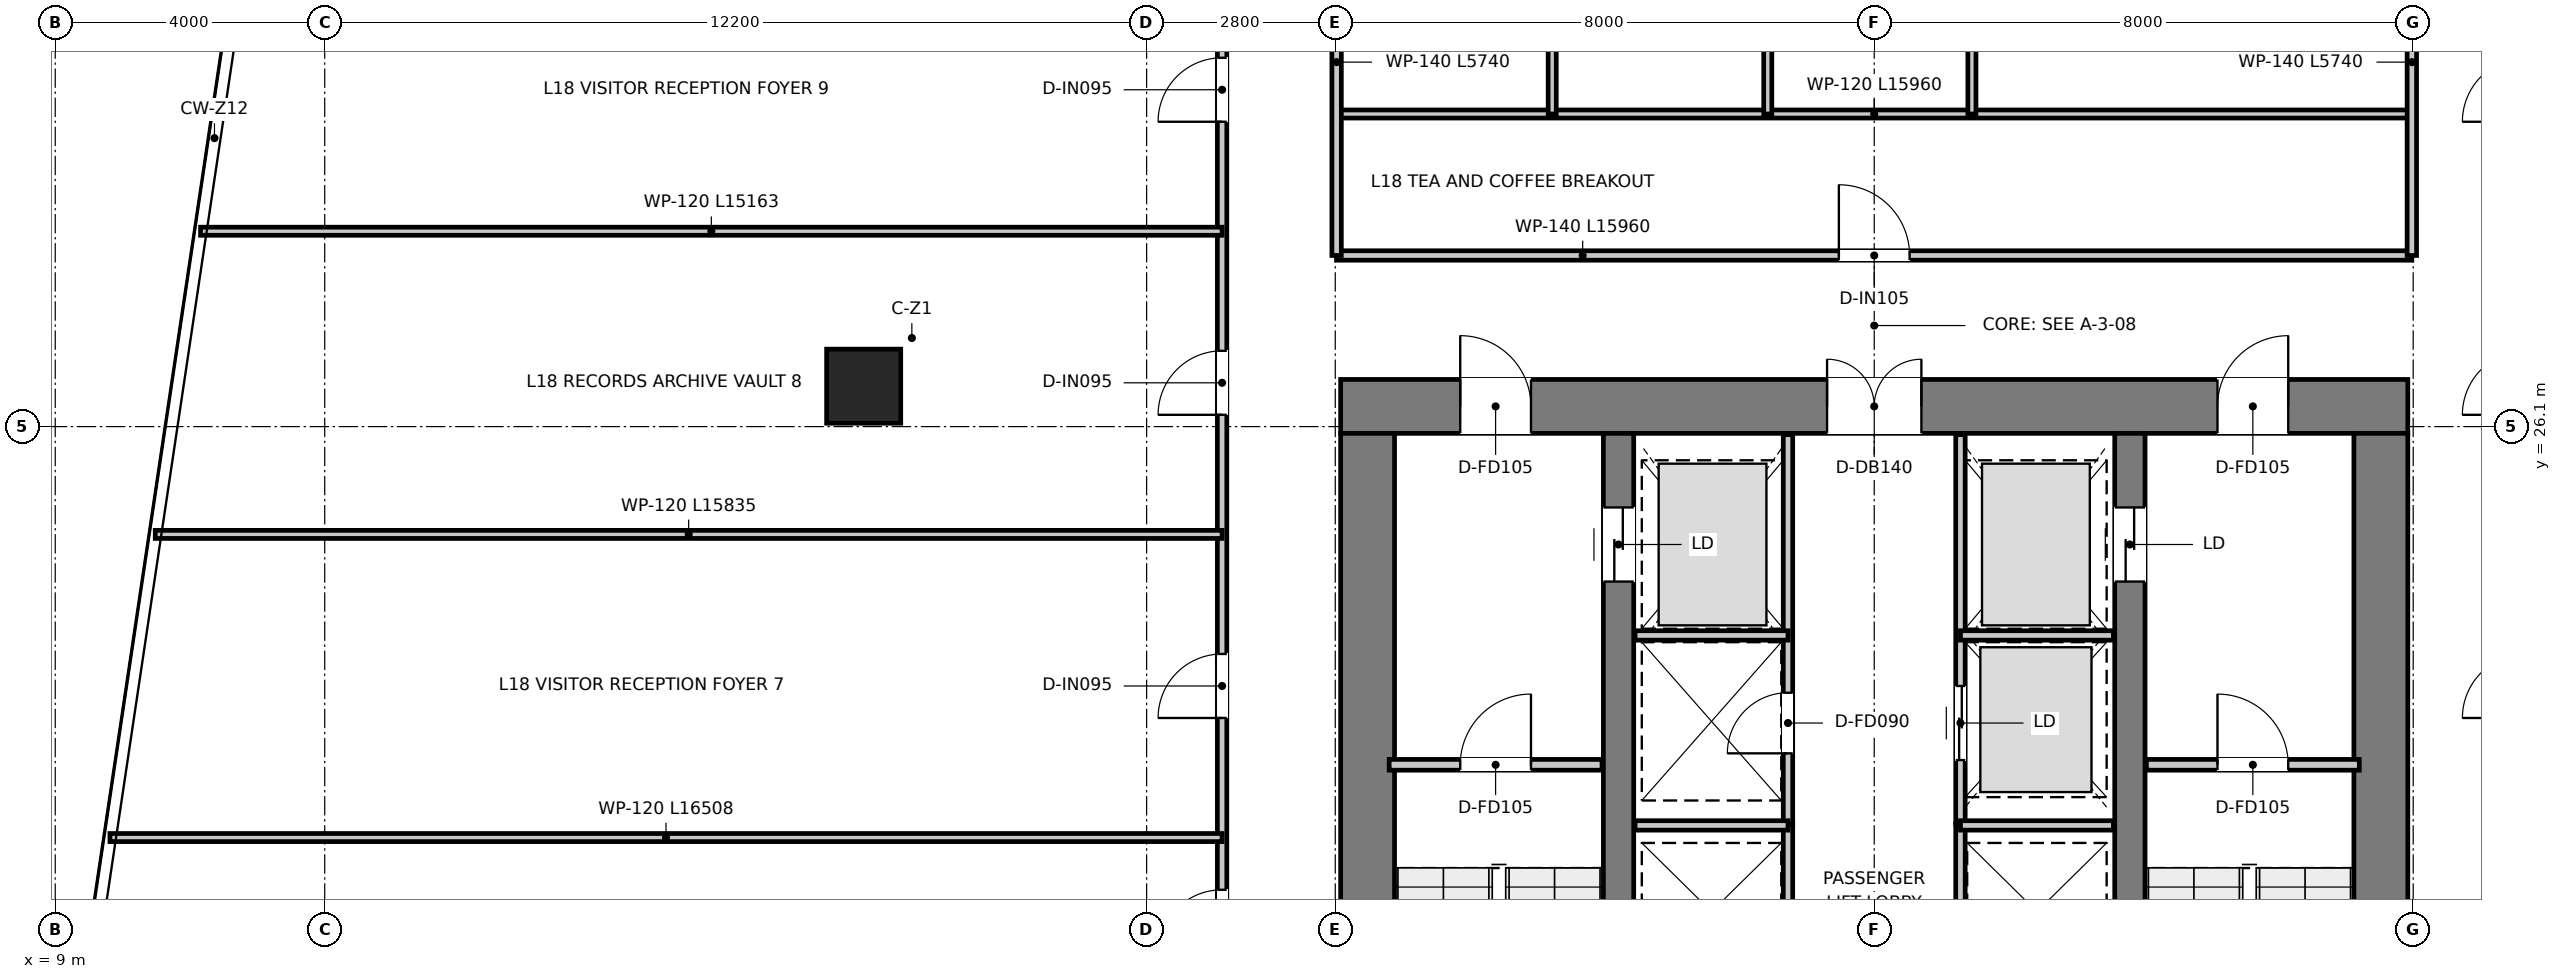
"""IFC4 building model, lengths in metres.
Left out: names, types, materials, properties, quantities, classifications, styles, units other than length and angle.
Written with IfcOpenShell. Run it as: python <this file> out.ifc"""

import sys

from ifc_helpers import new_model, si_unit, direction, frame, frame_2d, origin, origin_2d, place, context, subcontext, project, spatial, rectangle, extrude, source, transform, mapped, element, fill, save


model = new_model("IFC4")
c1 = context("Model", 3, precision=1e-05, world=origin(), true_north=direction((0.0, 1.0)))
c2 = subcontext(c1, "Body", "Model", "MODEL_VIEW")
j1 = project(units=[si_unit("LENGTHUNIT", "METRE"), si_unit("PLANEANGLEUNIT", "RADIAN")], contexts=[c1])
p1 = place(None, origin())
s1 = spatial("IfcSite", under=j1, at=p1, CompositionType="ELEMENT")
p2 = place(p1, origin())
s2 = spatial("IfcBuilding", under=s1, at=p2, CompositionType="ELEMENT")
p3 = place(p2, frame((0.0, 0.0, 76.35)))
s3 = spatial("IfcBuildingStorey", under=s2, at=p3, CompositionType="ELEMENT", Elevation=76.35)
p4 = place(p3, frame((28.08, 26.4, 0.0), z_axis=(0.0, 0.0, 1.0), x_axis=(1.0, 0.0, 0.0)))
e1 = element("IfcWall", 1, at=p4, inside=s3, PredefinedType="SHEAR", context=c2, shape_type="SweptSolid", body=[
    extrude(rectangle(XDim=15.84, YDim=0.8, at=frame_2d((7.92, 0.0))), origin(), (0.0, 0.0, 1.0), 3.95),
])
p5 = place(p4, frame((7.22, 0.0, 0.0)))
e2 = element("IfcOpeningElement", 2, at=p5, cuts=e1, PredefinedType="OPENING", context=c2, shape_type="SweptSolid", body=[
    extrude(rectangle(XDim=1.4, YDim=2.2, at=frame_2d((0.7, 1.1))), frame((0.0, 0.41, 0.0), z_axis=(0.0, -1.0, 0.0), x_axis=(1.0, 0.0, 0.0)), (0.0, 0.0, 1.0), 0.82),
])
p6 = place(p4, frame((1.775, 0.0, 0.0)))
e3 = element("IfcOpeningElement", 3, at=p6, cuts=e1, PredefinedType="OPENING", context=c2, shape_type="SweptSolid", body=[
    extrude(rectangle(XDim=1.05, YDim=2.1, at=frame_2d((0.525, 1.05))), frame((0.0, 0.41, 0.0), z_axis=(0.0, -1.0, 0.0), x_axis=(1.0, 0.0, 0.0)), (0.0, 0.0, 1.0), 0.82),
])
p7 = place(p4, frame((13.015, 0.0, 0.0)))
e4 = element("IfcOpeningElement", 4, at=p7, cuts=e1, PredefinedType="OPENING", context=c2, shape_type="SweptSolid", body=[
    extrude(rectangle(XDim=1.05, YDim=2.1, at=frame_2d((0.525, 1.05))), frame((0.0, 0.41, 0.0), z_axis=(0.0, -1.0, 0.0), x_axis=(1.0, 0.0, 0.0)), (0.0, 0.0, 1.0), 0.82),
])
for number, where, z_axis, x_axis in (
    (5, (28.48, 11.3, 0.0), (0.0, 0.0, 1.0), (0.0, 1.0, 0.0)),
    (6, (43.52, 11.3, 0.0), (0.0, 0.0, 1.0), (0.0, 1.0, 0.0)),
):
    element("IfcWall", number, at=place(p3, frame(where, z_axis=z_axis, x_axis=x_axis)), inside=s3, PredefinedType="SHEAR", context=c2, shape_type="SweptSolid", body=[
        extrude(rectangle(XDim=14.7, YDim=0.8, at=frame_2d((7.35, 0.0))), origin(), (0.0, 0.0, 1.0), 3.95),
    ])
p8 = place(p3, frame((32.205, 13.22, 0.0), z_axis=(0.0, 0.0, 1.0), x_axis=(0.0, 1.0, 0.0)))
e7 = element("IfcWall", 7, at=p8, inside=s3, PredefinedType="SHEAR", context=c2, shape_type="SweptSolid", body=[
    extrude(rectangle(XDim=12.78, YDim=0.45, at=frame_2d((6.39, 0.0))), origin(), (0.0, 0.0, 1.0), 3.95),
])
p9 = place(p8, frame((10.58, 0.0, 0.0)))
e8 = element("IfcOpeningElement", 8, at=p9, cuts=e7, PredefinedType="OPENING", context=c2, shape_type="SweptSolid", body=[
    extrude(rectangle(XDim=1.1, YDim=2.15, at=frame_2d((0.55, 1.075))), frame((0.0, 0.235, 0.0), z_axis=(0.0, -1.0, 0.0), x_axis=(1.0, 0.0, 0.0)), (0.0, 0.0, 1.0), 0.47),
])
p10 = place(p3, frame((39.795, 13.22, 0.0), z_axis=(0.0, 0.0, 1.0), x_axis=(0.0, 1.0, 0.0)))
e9 = element("IfcWall", 9, at=p10, inside=s3, PredefinedType="SHEAR", context=c2, shape_type="SweptSolid", body=[
    extrude(rectangle(XDim=12.78, YDim=0.45, at=frame_2d((6.39, 0.0))), origin(), (0.0, 0.0, 1.0), 3.95),
])
p11 = place(p10, frame((10.58, 0.0, 0.0)))
e10 = element("IfcOpeningElement", 10, at=p11, cuts=e9, PredefinedType="OPENING", context=c2, shape_type="SweptSolid", body=[
    extrude(rectangle(XDim=1.1, YDim=2.15, at=frame_2d((0.55, 1.075))), frame((0.0, 0.235, 0.0), z_axis=(0.0, -1.0, 0.0), x_axis=(1.0, 0.0, 0.0)), (0.0, 0.0, 1.0), 0.47),
])
m1 = source(origin(), c2, "Body", "SweptSolid", [
    extrude(rectangle(XDim=1.1, YDim=1.1, at=origin_2d()), origin(), (0.0, 0.0, 1.0), 3.95),
])
p12 = place(p3, frame((21.0, 26.7, 0.0), z_axis=(0.0, 0.0, 1.0), x_axis=(1.0, 0.0, 0.0)))
e11 = element("IfcColumn", 11, at=p12, inside=s3, PredefinedType="COLUMN", context=c2, shape_type="MappedRepresentation", body=[
    mapped(m1, transform((0.0, 0.0, 0.0), x_axis=(1.0, 0.0, 0.0), y_axis=(0.0, 1.0, 0.0), z_axis=(0.0, 0.0, 1.0), scale=1.0)),
])
p13 = place(p3, frame((28.8, 21.08, 0.0), z_axis=(0.0, 0.0, 1.0), x_axis=(1.0, 0.0, 0.0)))
e12 = element("IfcWall", 12, at=p13, inside=s3, PredefinedType="PARTITIONING", context=c2, shape_type="SweptSolid", body=[
    extrude(rectangle(XDim=3.16, YDim=0.16, at=frame_2d((1.58, 0.0))), origin(), (0.0, 0.0, 1.0), 3.59),
])
p14 = place(p13, frame((1.055, 0.0, 0.0)))
e13 = element("IfcOpeningElement", 13, at=p14, cuts=e12, PredefinedType="OPENING", context=c2, shape_type="SweptSolid", body=[
    extrude(rectangle(XDim=1.05, YDim=2.1, at=frame_2d((0.525, 1.05))), frame((0.0, 0.09, 0.0), z_axis=(0.0, -1.0, 0.0), x_axis=(1.0, 0.0, 0.0)), (0.0, 0.0, 1.0), 0.18),
])
p15 = place(p3, frame((40.04, 21.08, 0.0), z_axis=(0.0, 0.0, 1.0), x_axis=(1.0, 0.0, 0.0)))
e14 = element("IfcWall", 14, at=p15, inside=s3, PredefinedType="PARTITIONING", context=c2, shape_type="SweptSolid", body=[
    extrude(rectangle(XDim=3.16, YDim=0.16, at=frame_2d((1.58, 0.0))), origin(), (0.0, 0.0, 1.0), 3.59),
])
p16 = place(p15, frame((1.055, 0.0, 0.0)))
e15 = element("IfcOpeningElement", 15, at=p16, cuts=e14, PredefinedType="OPENING", context=c2, shape_type="SweptSolid", body=[
    extrude(rectangle(XDim=1.05, YDim=2.1, at=frame_2d((0.525, 1.05))), frame((0.0, 0.09, 0.0), z_axis=(0.0, -1.0, 0.0), x_axis=(1.0, 0.0, 0.0)), (0.0, 0.0, 1.0), 0.18),
])
p17 = place(p3, frame((34.72, 20.2, 0.0), z_axis=(0.0, 0.0, 1.0), x_axis=(0.0, 1.0, 0.0)))
e16 = element("IfcWall", 16, at=p17, inside=s3, PredefinedType="PARTITIONING", context=c2, shape_type="SweptSolid", body=[
    extrude(rectangle(XDim=5.78, YDim=0.14, at=frame_2d((2.89, 0.0))), origin(), (0.0, 0.0, 1.0), 2.39),
])
p18 = place(p17, frame((1.05, 0.0, 0.0)))
e17 = element("IfcOpeningElement", 17, at=p18, cuts=e16, PredefinedType="OPENING", context=c2, shape_type="SweptSolid", body=[
    extrude(rectangle(XDim=0.9, YDim=2.1, at=frame_2d((0.45, 1.05))), frame((0.0, 0.08, 0.0), z_axis=(0.0, -1.0, 0.0), x_axis=(1.0, 0.0, 0.0)), (0.0, 0.0, 1.0), 0.16),
])
p19 = place(p3, frame((37.28, 20.2, 0.0), z_axis=(0.0, 0.0, 1.0), x_axis=(0.0, 1.0, 0.0)))
e18 = element("IfcWall", 18, at=p19, inside=s3, PredefinedType="PARTITIONING", context=c2, shape_type="SweptSolid", body=[
    extrude(rectangle(XDim=5.78, YDim=0.14, at=frame_2d((2.89, 0.0))), origin(), (0.0, 0.0, 1.0), 2.39),
])
p20 = place(p19, frame((0.95, 0.0, 0.0)))
e19 = element("IfcOpeningElement", 19, at=p20, cuts=e18, PredefinedType="OPENING", context=c2, shape_type="SweptSolid", body=[
    extrude(rectangle(XDim=1.1, YDim=2.15, at=frame_2d((0.55, 1.075))), frame((0.0, 0.08, 0.0), z_axis=(0.0, -1.0, 0.0), x_axis=(1.0, 0.0, 0.0)), (0.0, 0.0, 1.0), 0.16),
])
for number, where, z_axis, x_axis in (
    (20, (32.45, 23.0, 0.0), (0.0, 0.0, 1.0), (1.0, 0.0, 0.0)),
    (21, (37.28, 23.0, 0.0), (0.0, 0.0, 1.0), (1.0, 0.0, 0.0)),
):
    element("IfcWall", number, at=place(p3, frame(where, z_axis=z_axis, x_axis=x_axis)), inside=s3, PredefinedType="PARTITIONING", context=c2, shape_type="SweptSolid", body=[
        extrude(rectangle(XDim=2.27, YDim=0.14, at=frame_2d((1.135, 0.0))), origin(), (0.0, 0.0, 1.0), 2.39),
    ])
for number, where, z_axis, x_axis in (
    (22, (34.72, 17.78, 0.0), (0.0, 0.0, 1.0), (0.0, 1.0, 0.0)),
    (23, (37.28, 17.78, 0.0), (0.0, 0.0, 1.0), (0.0, 1.0, 0.0)),
):
    element("IfcWall", number, at=place(p3, frame(where, z_axis=z_axis, x_axis=x_axis)), inside=s3, PredefinedType="PARTITIONING", context=c2, shape_type="SweptSolid", body=[
        extrude(rectangle(XDim=2.42, YDim=0.14, at=frame_2d((1.21, 0.0))), origin(), (0.0, 0.0, 1.0), 3.59),
    ])
for number, where, z_axis, x_axis in (
    (24, (32.45, 20.18, 0.0), (0.0, 0.0, 1.0), (1.0, 0.0, 0.0)),
    (25, (37.28, 20.18, 0.0), (0.0, 0.0, 1.0), (1.0, 0.0, 0.0)),
):
    element("IfcWall", number, at=place(p3, frame(where, z_axis=z_axis, x_axis=x_axis)), inside=s3, PredefinedType="PARTITIONING", context=c2, shape_type="SweptSolid", body=[
        extrude(rectangle(XDim=2.27, YDim=0.14, at=frame_2d((1.135, 0.0))), origin(), (0.0, 0.0, 1.0), 3.59),
    ])
p21 = place(p3, frame((28.02, 28.64, 0.0), z_axis=(0.0, 0.0, 1.0), x_axis=(1.0, 0.0, 0.0)))
e26 = element("IfcWall", 26, at=p21, inside=s3, PredefinedType="PARTITIONING", context=c2, shape_type="SweptSolid", body=[
    extrude(rectangle(XDim=15.96, YDim=0.14, at=frame_2d((7.98, 0.0))), origin(), (0.0, 0.0, 1.0), 3.0),
])
p22 = place(p21, frame((7.455, 0.0, 0.0)))
e27 = element("IfcOpeningElement", 27, at=p22, cuts=e26, PredefinedType="OPENING", context=c2, shape_type="SweptSolid", body=[
    extrude(rectangle(XDim=1.05, YDim=2.15, at=frame_2d((0.525, 1.075))), frame((0.0, 0.08, 0.0), z_axis=(0.0, -1.0, 0.0), x_axis=(1.0, 0.0, 0.0)), (0.0, 0.0, 1.0), 0.16),
])
p23 = place(p3, frame((28.02, 30.74, 0.0), z_axis=(0.0, 0.0, 1.0), x_axis=(1.0, 0.0, 0.0)))
e28 = element("IfcWall", 28, at=p23, inside=s3, PredefinedType="PARTITIONING", context=c2, shape_type="SweptSolid", body=[
    extrude(rectangle(XDim=15.96, YDim=0.12, at=frame_2d((7.98, 0.0))), origin(), (0.0, 0.0, 1.0), 3.0),
])
for number, where, z_axis, x_axis in (
    (29, (28.02, 28.64, 0.0), (0.0, 0.0, 1.0), (0.0, 1.0, 0.0)),
    (30, (43.98, 28.64, 0.0), (0.0, 0.0, 1.0), (0.0, 1.0, 0.0)),
):
    element("IfcWall", number, at=place(p3, frame(where, z_axis=z_axis, x_axis=x_axis)), inside=s3, PredefinedType="PARTITIONING", context=c2, shape_type="SweptSolid", body=[
        extrude(rectangle(XDim=5.74, YDim=0.14, at=frame_2d((2.87, 0.0))), origin(), (0.0, 0.0, 1.0), 3.14),
    ])
for number, where, z_axis, x_axis in (
    (31, (31.22, 30.74, 0.0), (0.0, 0.0, 1.0), (0.0, 1.0, 0.0)),
    (32, (34.42, 30.74, 0.0), (0.0, 0.0, 1.0), (0.0, 1.0, 0.0)),
    (33, (37.45, 30.74, 0.0), (0.0, 0.0, 1.0), (0.0, 1.0, 0.0)),
):
    element("IfcWall", number, at=place(p3, frame(where, z_axis=z_axis, x_axis=x_axis)), inside=s3, PredefinedType="PARTITIONING", context=c2, shape_type="SweptSolid", body=[
        extrude(rectangle(XDim=3.64, YDim=0.12, at=frame_2d((1.82, 0.0))), origin(), (0.0, 0.0, 1.0), 3.04),
    ])
p24 = place(p3, frame((26.32, 10.5, 0.0), z_axis=(0.0, 0.0, 1.0), x_axis=(0.0, 1.0, 0.0)))
e34 = element("IfcWall", 34, at=p24, inside=s3, PredefinedType="PARTITIONING", context=c2, shape_type="SweptSolid", body=[
    extrude(rectangle(XDim=25.62, YDim=0.14, at=frame_2d((12.81, 0.0))), origin(), (0.0, 0.0, 1.0), 2.89),
])
p25 = place(p24, frame((7.775, 0.0, 0.0)))
e35 = element("IfcOpeningElement", 35, at=p25, cuts=e34, PredefinedType="OPENING", context=c2, shape_type="SweptSolid", body=[
    extrude(rectangle(XDim=0.95, YDim=2.1, at=frame_2d((0.475, 1.05))), frame((0.0, 0.08, 0.0), z_axis=(0.0, -1.0, 0.0), x_axis=(1.0, 0.0, 0.0)), (0.0, 0.0, 1.0), 0.16),
])
p26 = place(p24, frame((11.275, 0.0, 0.0)))
e36 = element("IfcOpeningElement", 36, at=p26, cuts=e34, PredefinedType="OPENING", context=c2, shape_type="SweptSolid", body=[
    extrude(rectangle(XDim=0.95, YDim=2.1, at=frame_2d((0.475, 1.05))), frame((0.0, 0.08, 0.0), z_axis=(0.0, -1.0, 0.0), x_axis=(1.0, 0.0, 0.0)), (0.0, 0.0, 1.0), 0.16),
])
p27 = place(p24, frame((15.775, 0.0, 0.0)))
e37 = element("IfcOpeningElement", 37, at=p27, cuts=e34, PredefinedType="OPENING", context=c2, shape_type="SweptSolid", body=[
    extrude(rectangle(XDim=0.95, YDim=2.1, at=frame_2d((0.475, 1.05))), frame((0.0, 0.08, 0.0), z_axis=(0.0, -1.0, 0.0), x_axis=(1.0, 0.0, 0.0)), (0.0, 0.0, 1.0), 0.16),
])
p28 = place(p24, frame((20.125, 0.0, 0.0)))
e38 = element("IfcOpeningElement", 38, at=p28, cuts=e34, PredefinedType="OPENING", context=c2, shape_type="SweptSolid", body=[
    extrude(rectangle(XDim=0.95, YDim=2.1, at=frame_2d((0.475, 1.05))), frame((0.0, 0.08, 0.0), z_axis=(0.0, -1.0, 0.0), x_axis=(1.0, 0.0, 0.0)), (0.0, 0.0, 1.0), 0.16),
])
p29 = place(p24, frame((22.975, 0.0, 0.0)))
e39 = element("IfcOpeningElement", 39, at=p29, cuts=e34, PredefinedType="OPENING", context=c2, shape_type="SweptSolid", body=[
    extrude(rectangle(XDim=0.95, YDim=2.1, at=frame_2d((0.475, 1.05))), frame((0.0, 0.08, 0.0), z_axis=(0.0, -1.0, 0.0), x_axis=(1.0, 0.0, 0.0)), (0.0, 0.0, 1.0), 0.16),
])
p30 = place(p3, frame((9.812, 20.0, 0.0), z_axis=(0.0, 0.0, 1.0), x_axis=(1.0, 0.0, 0.0)))
e40 = element("IfcWall", 40, at=p30, inside=s3, PredefinedType="PARTITIONING", context=c2, shape_type="SweptSolid", body=[
    extrude(rectangle(XDim=16.508, YDim=0.12, at=frame_2d((8.254, 0.0))), origin(), (0.0, 0.0, 1.0), 2.89),
])
p31 = place(p3, frame((10.485, 24.5, 0.0), z_axis=(0.0, 0.0, 1.0), x_axis=(1.0, 0.0, 0.0)))
e41 = element("IfcWall", 41, at=p31, inside=s3, PredefinedType="PARTITIONING", context=c2, shape_type="SweptSolid", body=[
    extrude(rectangle(XDim=15.835, YDim=0.12, at=frame_2d((7.918, 0.0))), origin(), (0.0, 0.0, 1.0), 2.89),
])
p32 = place(p3, frame((11.157, 29.0, 0.0), z_axis=(0.0, 0.0, 1.0), x_axis=(1.0, 0.0, 0.0)))
e42 = element("IfcWall", 42, at=p32, inside=s3, PredefinedType="PARTITIONING", context=c2, shape_type="SweptSolid", body=[
    extrude(rectangle(XDim=15.163, YDim=0.12, at=frame_2d((7.582, 0.0))), origin(), (0.0, 0.0, 1.0), 2.89),
])
p33 = place(p14, origin())
e43 = element("IfcDoor", 43, at=p33, inside=s3, OperationType="SINGLE_SWING_RIGHT", PredefinedType="DOOR", context=c2, shape_type="SweptSolid", body=[
    extrude(rectangle(XDim=1.05, YDim=2.1, at=frame_2d((0.525, 1.05))), frame((0.0, 0.025, 0.0), z_axis=(0.0, -1.0, 0.0), x_axis=(1.0, 0.0, 0.0)), (0.0, 0.0, 1.0), 0.05),
])
fill(e13, e43)
p34 = place(p16, origin())
e44 = element("IfcDoor", 44, at=p34, inside=s3, OperationType="SINGLE_SWING_LEFT", PredefinedType="DOOR", context=c2, shape_type="SweptSolid", body=[
    extrude(rectangle(XDim=1.05, YDim=2.1, at=frame_2d((0.525, 1.05))), frame((0.0, 0.025, 0.0), z_axis=(0.0, -1.0, 0.0), x_axis=(1.0, 0.0, 0.0)), (0.0, 0.0, 1.0), 0.05),
])
fill(e15, e44)
p35 = place(p5, origin())
e45 = element("IfcDoor", 45, at=p35, inside=s3, OperationType="DOUBLE_DOOR_SINGLE_SWING", PredefinedType="DOOR", context=c2, shape_type="SweptSolid", body=[
    extrude(rectangle(XDim=1.4, YDim=2.2, at=frame_2d((0.7, 1.1))), frame((0.0, 0.025, 0.0), z_axis=(0.0, -1.0, 0.0), x_axis=(1.0, 0.0, 0.0)), (0.0, 0.0, 1.0), 0.05),
])
fill(e2, e45)
p36 = place(p6, origin())
e46 = element("IfcDoor", 46, at=p36, inside=s3, OperationType="SINGLE_SWING_LEFT", PredefinedType="DOOR", context=c2, shape_type="SweptSolid", body=[
    extrude(rectangle(XDim=1.05, YDim=2.1, at=frame_2d((0.525, 1.05))), frame((0.0, 0.025, 0.0), z_axis=(0.0, -1.0, 0.0), x_axis=(1.0, 0.0, 0.0)), (0.0, 0.0, 1.0), 0.05),
])
fill(e3, e46)
p37 = place(p7, origin())
e47 = element("IfcDoor", 47, at=p37, inside=s3, OperationType="SINGLE_SWING_RIGHT", PredefinedType="DOOR", context=c2, shape_type="SweptSolid", body=[
    extrude(rectangle(XDim=1.05, YDim=2.1, at=frame_2d((0.525, 1.05))), frame((0.0, 0.025, 0.0), z_axis=(0.0, -1.0, 0.0), x_axis=(1.0, 0.0, 0.0)), (0.0, 0.0, 1.0), 0.05),
])
fill(e4, e47)
p38 = place(p9, origin())
e48 = element("IfcDoor", 48, at=p38, inside=s3, OperationType="DOUBLE_DOOR_SLIDING", PredefinedType="DOOR", context=c2, shape_type="SweptSolid", body=[
    extrude(rectangle(XDim=1.1, YDim=2.15, at=frame_2d((0.55, 1.075))), frame((0.0, 0.025, 0.0), z_axis=(0.0, -1.0, 0.0), x_axis=(1.0, 0.0, 0.0)), (0.0, 0.0, 1.0), 0.05),
])
fill(e8, e48)
p39 = place(p11, origin())
e49 = element("IfcDoor", 49, at=p39, inside=s3, OperationType="DOUBLE_DOOR_SLIDING", PredefinedType="DOOR", context=c2, shape_type="SweptSolid", body=[
    extrude(rectangle(XDim=1.1, YDim=2.15, at=frame_2d((0.55, 1.075))), frame((0.0, 0.025, 0.0), z_axis=(0.0, -1.0, 0.0), x_axis=(1.0, 0.0, 0.0)), (0.0, 0.0, 1.0), 0.05),
])
fill(e10, e49)
p40 = place(p18, origin())
e50 = element("IfcDoor", 50, at=p40, inside=s3, OperationType="SINGLE_SWING_LEFT", PredefinedType="DOOR", context=c2, shape_type="SweptSolid", body=[
    extrude(rectangle(XDim=0.9, YDim=2.1, at=frame_2d((0.45, 1.05))), frame((0.0, 0.025, 0.0), z_axis=(0.0, -1.0, 0.0), x_axis=(1.0, 0.0, 0.0)), (0.0, 0.0, 1.0), 0.05),
])
fill(e17, e50)
p41 = place(p20, origin())
e51 = element("IfcDoor", 51, at=p41, inside=s3, OperationType="DOUBLE_DOOR_SLIDING", PredefinedType="DOOR", context=c2, shape_type="SweptSolid", body=[
    extrude(rectangle(XDim=1.1, YDim=2.15, at=frame_2d((0.55, 1.075))), frame((0.0, 0.025, 0.0), z_axis=(0.0, -1.0, 0.0), x_axis=(1.0, 0.0, 0.0)), (0.0, 0.0, 1.0), 0.05),
])
fill(e19, e51)
p42 = place(p22, origin())
e52 = element("IfcDoor", 52, at=p42, inside=s3, OperationType="SINGLE_SWING_LEFT", PredefinedType="DOOR", context=c2, shape_type="SweptSolid", body=[
    extrude(rectangle(XDim=1.05, YDim=2.15, at=frame_2d((0.525, 1.075))), frame((0.0, 0.025, 0.0), z_axis=(0.0, -1.0, 0.0), x_axis=(1.0, 0.0, 0.0)), (0.0, 0.0, 1.0), 0.05),
])
fill(e27, e52)
p43 = place(p25, origin())
e53 = element("IfcDoor", 53, at=p43, inside=s3, OperationType="SINGLE_SWING_LEFT", PredefinedType="DOOR", context=c2, shape_type="SweptSolid", body=[
    extrude(rectangle(XDim=0.95, YDim=2.1, at=frame_2d((0.475, 1.05))), frame((0.0, 0.025, 0.0), z_axis=(0.0, -1.0, 0.0), x_axis=(1.0, 0.0, 0.0)), (0.0, 0.0, 1.0), 0.05),
])
fill(e35, e53)
p44 = place(p26, origin())
e54 = element("IfcDoor", 54, at=p44, inside=s3, OperationType="SINGLE_SWING_LEFT", PredefinedType="DOOR", context=c2, shape_type="SweptSolid", body=[
    extrude(rectangle(XDim=0.95, YDim=2.1, at=frame_2d((0.475, 1.05))), frame((0.0, 0.025, 0.0), z_axis=(0.0, -1.0, 0.0), x_axis=(1.0, 0.0, 0.0)), (0.0, 0.0, 1.0), 0.05),
])
fill(e36, e54)
p45 = place(p27, origin())
e55 = element("IfcDoor", 55, at=p45, inside=s3, OperationType="SINGLE_SWING_LEFT", PredefinedType="DOOR", context=c2, shape_type="SweptSolid", body=[
    extrude(rectangle(XDim=0.95, YDim=2.1, at=frame_2d((0.475, 1.05))), frame((0.0, 0.025, 0.0), z_axis=(0.0, -1.0, 0.0), x_axis=(1.0, 0.0, 0.0)), (0.0, 0.0, 1.0), 0.05),
])
fill(e37, e55)
p46 = place(p28, origin())
e56 = element("IfcDoor", 56, at=p46, inside=s3, OperationType="SINGLE_SWING_LEFT", PredefinedType="DOOR", context=c2, shape_type="SweptSolid", body=[
    extrude(rectangle(XDim=0.95, YDim=2.1, at=frame_2d((0.475, 1.05))), frame((0.0, 0.025, 0.0), z_axis=(0.0, -1.0, 0.0), x_axis=(1.0, 0.0, 0.0)), (0.0, 0.0, 1.0), 0.05),
])
fill(e38, e56)
save(model, sys.argv[1])
